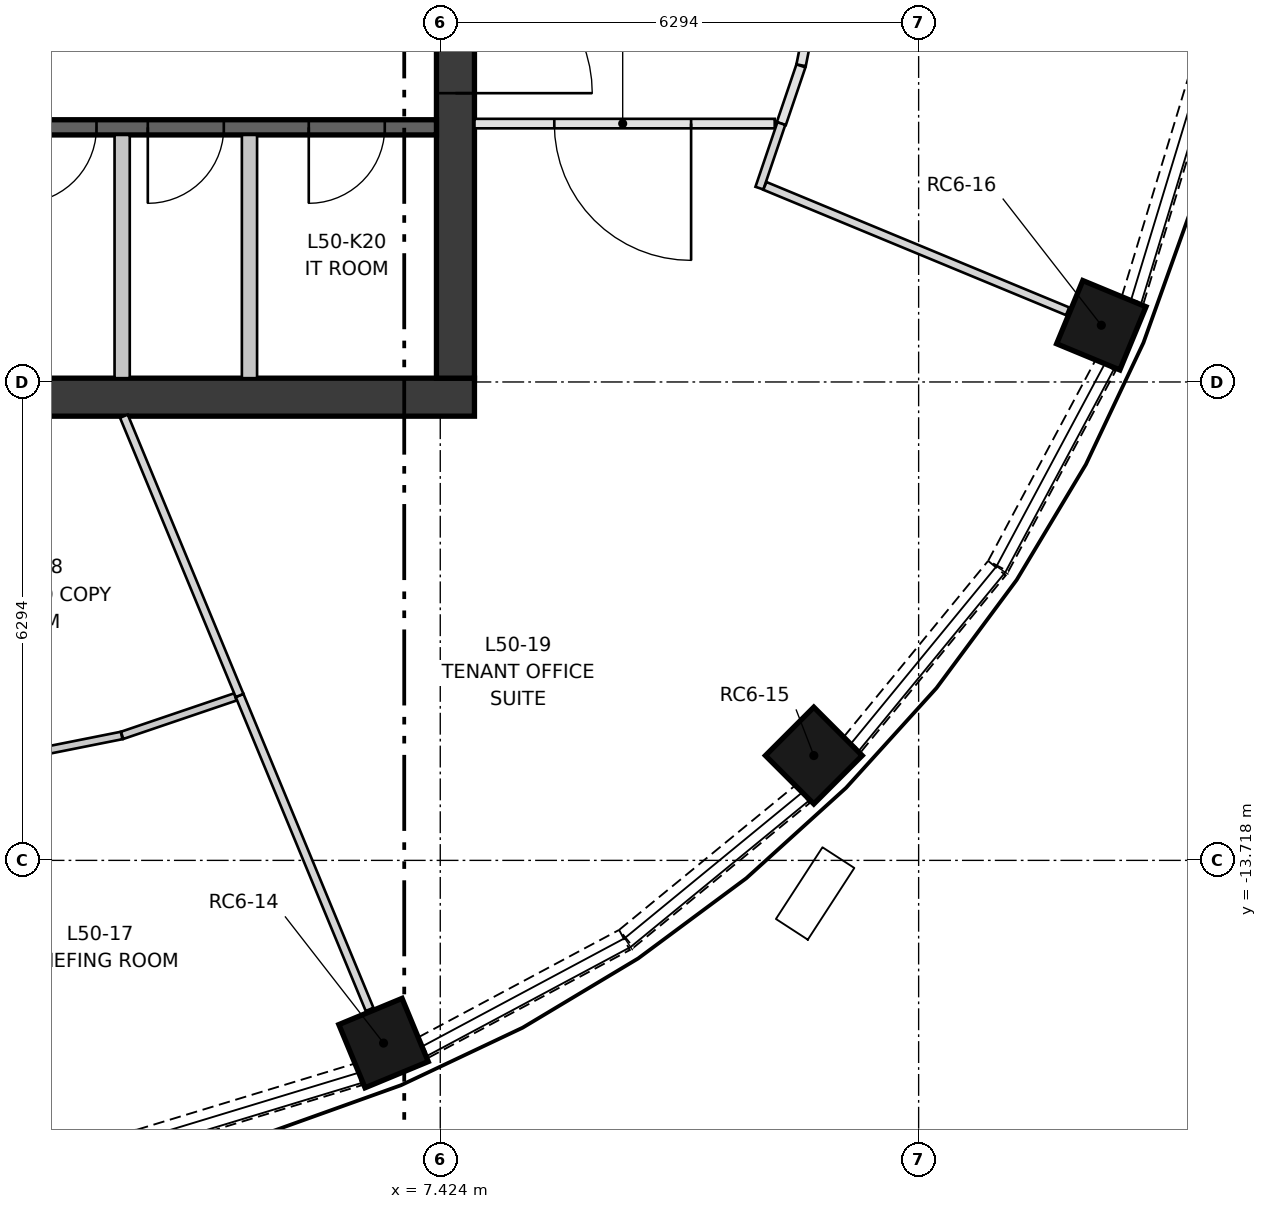
"""IFC4 building model, lengths in metres.
Left out: names, types, materials, properties, quantities, classifications, styles, units other than length and angle.
Written with IfcOpenShell. Run it as: python <this file> out.ifc"""

import sys

from ifc_helpers import new_model, si_unit, direction, frame, frame_2d, origin, origin_2d, place, context, subcontext, project, spatial, rectangle, extrude, element, fill, save


model = new_model("IFC4")
c1 = context("Model", 3, precision=1e-05, world=origin(), true_north=direction((0.0, 1.0)))
c2 = subcontext(c1, "Body", "Model", "MODEL_VIEW")
j1 = project(units=[si_unit("LENGTHUNIT", "METRE"), si_unit("PLANEANGLEUNIT", "RADIAN")], contexts=[c1])
p1 = place(None, origin())
s1 = spatial("IfcSite", under=j1, at=p1, CompositionType="ELEMENT")
p2 = place(p1, origin())
s2 = spatial("IfcBuilding", under=s1, at=p2, CompositionType="ELEMENT")
p3 = place(p2, frame((0.0, 0.0, 187.65)))
s3 = spatial("IfcBuildingStorey", under=s2, at=p3, CompositionType="ELEMENT", Elevation=187.65)
for number, where, z_axis, x_axis in (
    (1, (6.678, -16.122, 0.5), (0.0, 0.0, 1.0), (0.383, -0.924, 0.0)),
    (2, (12.339, -12.339, 0.5), (0.0, 0.0, 1.0), (0.707, -0.707, 0.0)),
    (3, (16.122, -6.678, 0.5), (0.0, 0.0, 1.0), (0.924, -0.383, 0.0)),
):
    element("IfcColumn", number, at=place(p3, frame(where, z_axis=z_axis, x_axis=x_axis)), inside=s3, PredefinedType="COLUMN", context=c2, shape_type="SweptSolid", body=[
        extrude(rectangle(XDim=0.9, YDim=0.9, at=origin_2d()), origin(), (0.0, 0.0, 1.0), 2.85),
    ])
p4 = place(p3, frame((-7.874, -7.624, 0.0), z_axis=(0.0, 0.0, 1.0), x_axis=(1.0, 0.0, 0.0)))
e4 = element("IfcWall", 4, at=p4, inside=s3, PredefinedType="SHEAR", context=c2, shape_type="SweptSolid", body=[
    extrude(rectangle(XDim=15.748, YDim=0.5, at=frame_2d((7.874, 0.0))), origin(), (0.0, 0.0, 1.0), 3.35),
])
p5 = place(p3, frame((7.624, -7.374, 0.0), z_axis=(0.0, 0.0, 1.0), x_axis=(0.0, 1.0, 0.0)))
e5 = element("IfcWall", 5, at=p5, inside=s3, PredefinedType="SHEAR", context=c2, shape_type="SweptSolid", body=[
    extrude(rectangle(XDim=14.748, YDim=0.5, at=frame_2d((7.374, 0.0))), origin(), (0.0, 0.0, 1.0), 3.35),
])
p6 = place(p5, frame((6.874, 0.0, 0.0)))
e6 = element("IfcOpeningElement", 6, at=p6, cuts=e5, PredefinedType="OPENING", context=c2, shape_type="SweptSolid", body=[
    extrude(rectangle(XDim=1.0, YDim=2.1, at=frame_2d((0.5, 1.05))), frame((0.0, 0.26, 0.0), z_axis=(0.0, -1.0, 0.0), x_axis=(1.0, 0.0, 0.0)), (0.0, 0.0, 1.0), 0.52),
])
p7 = place(p5, frame((3.75, 0.0, 0.0)))
e7 = element("IfcOpeningElement", 7, at=p7, cuts=e5, PredefinedType="OPENING", context=c2, shape_type="SweptSolid", body=[
    extrude(rectangle(XDim=1.8, YDim=2.1, at=frame_2d((0.9, 1.05))), frame((0.0, 0.26, 0.0), z_axis=(0.0, -1.0, 0.0), x_axis=(1.0, 0.0, 0.0)), (0.0, 0.0, 1.0), 0.52),
])
p8 = place(p5, frame((9.198, 0.0, 0.0)))
e8 = element("IfcOpeningElement", 8, at=p8, cuts=e5, PredefinedType="OPENING", context=c2, shape_type="SweptSolid", body=[
    extrude(rectangle(XDim=1.8, YDim=2.1, at=frame_2d((0.9, 1.05))), frame((0.0, 0.26, 0.0), z_axis=(0.0, -1.0, 0.0), x_axis=(1.0, 0.0, 0.0)), (0.0, 0.0, 1.0), 0.52),
])
p9 = place(p3, frame((-7.374, -4.074, 0.0), z_axis=(0.0, 0.0, 1.0), x_axis=(1.0, 0.0, 0.0)))
e9 = element("IfcWall", 9, at=p9, inside=s3, PredefinedType="SHEAR", context=c2, shape_type="SweptSolid", body=[
    extrude(rectangle(XDim=14.748, YDim=0.2, at=frame_2d((7.374, 0.0))), origin(), (0.0, 0.0, 1.0), 3.0),
])
p10 = place(p9, frame((1.319, 0.0, 0.0)))
e10 = element("IfcOpeningElement", 10, at=p10, cuts=e9, PredefinedType="OPENING", context=c2, shape_type="SweptSolid", body=[
    extrude(rectangle(XDim=1.1, YDim=2.1, at=frame_2d((0.55, 1.05))), frame((0.0, 0.11, 0.0), z_axis=(0.0, -1.0, 0.0), x_axis=(1.0, 0.0, 0.0)), (0.0, 0.0, 1.0), 0.22),
])
p11 = place(p9, frame((4.456, 0.0, 0.0)))
e11 = element("IfcOpeningElement", 11, at=p11, cuts=e9, PredefinedType="OPENING", context=c2, shape_type="SweptSolid", body=[
    extrude(rectangle(XDim=1.1, YDim=2.1, at=frame_2d((0.55, 1.05))), frame((0.0, 0.11, 0.0), z_axis=(0.0, -1.0, 0.0), x_axis=(1.0, 0.0, 0.0)), (0.0, 0.0, 1.0), 0.22),
])
p12 = place(p9, frame((7.256, 0.0, 0.0)))
e12 = element("IfcOpeningElement", 12, at=p12, cuts=e9, PredefinedType="OPENING", context=c2, shape_type="SweptSolid", body=[
    extrude(rectangle(XDim=1.0, YDim=2.1, at=frame_2d((0.5, 1.05))), frame((0.0, 0.11, 0.0), z_axis=(0.0, -1.0, 0.0), x_axis=(1.0, 0.0, 0.0)), (0.0, 0.0, 1.0), 0.22),
])
p13 = place(p9, frame((9.275, 0.0, 0.0)))
e13 = element("IfcOpeningElement", 13, at=p13, cuts=e9, PredefinedType="OPENING", context=c2, shape_type="SweptSolid", body=[
    extrude(rectangle(XDim=1.0, YDim=2.1, at=frame_2d((0.5, 1.05))), frame((0.0, 0.11, 0.0), z_axis=(0.0, -1.0, 0.0), x_axis=(1.0, 0.0, 0.0)), (0.0, 0.0, 1.0), 0.22),
])
p14 = place(p9, frame((10.95, 0.0, 0.0)))
e14 = element("IfcOpeningElement", 14, at=p14, cuts=e9, PredefinedType="OPENING", context=c2, shape_type="SweptSolid", body=[
    extrude(rectangle(XDim=1.0, YDim=2.1, at=frame_2d((0.5, 1.05))), frame((0.0, 0.11, 0.0), z_axis=(0.0, -1.0, 0.0), x_axis=(1.0, 0.0, 0.0)), (0.0, 0.0, 1.0), 0.22),
])
p15 = place(p9, frame((13.068, 0.0, 0.0)))
e15 = element("IfcOpeningElement", 15, at=p15, cuts=e9, PredefinedType="OPENING", context=c2, shape_type="SweptSolid", body=[
    extrude(rectangle(XDim=1.0, YDim=2.1, at=frame_2d((0.5, 1.05))), frame((0.0, 0.11, 0.0), z_axis=(0.0, -1.0, 0.0), x_axis=(1.0, 0.0, 0.0)), (0.0, 0.0, 1.0), 0.22),
])
for number, where, z_axis, x_axis in (
    (16, (3.239, -7.374, 0.0), (0.0, 0.0, 1.0), (0.0, 1.0, 0.0)),
    (17, (4.914, -7.374, 0.0), (0.0, 0.0, 1.0), (0.0, 1.0, 0.0)),
):
    element("IfcWall", number, at=place(p3, frame(where, z_axis=z_axis, x_axis=x_axis)), inside=s3, PredefinedType="PARTITIONING", context=c2, shape_type="SweptSolid", body=[
        extrude(rectangle(XDim=3.2, YDim=0.2, at=frame_2d((1.6, 0.0))), origin(), (0.0, 0.0, 1.0), 3.0),
    ])
p16 = place(p3, frame((3.477, -17.405, 0.0), z_axis=(0.0, 0.0, 1.0), x_axis=(0.95687774785, 0.290490921835, 0.0)))
e18 = element("IfcWall", 18, at=p16, inside=s3, PredefinedType="SOLIDWALL", context=c2, shape_type="SweptSolid", body=[
    extrude(rectangle(XDim=2.999, YDim=0.3, at=frame_2d((1.5, 0.0))), origin(), (0.0, 0.0, 1.0), 0.9),
])
p17 = place(p3, frame((7.204, -16.179, 0.0), z_axis=(0.0, 0.0, 1.0), x_axis=(0.881827169278, 0.471572734074, 0.0)))
e19 = element("IfcWall", 19, at=p17, inside=s3, PredefinedType="SOLIDWALL", context=c2, shape_type="SweptSolid", body=[
    extrude(rectangle(XDim=2.998, YDim=0.3, at=frame_2d((1.499, 0.0))), origin(), (0.0, 0.0, 1.0), 0.9),
])
for number, where, z_axis, x_axis in (
    (20, (9.873, -14.749, 0.0), (0.0, 0.0, 1.0), (0.773, 0.634, 0.0)),
    (21, (12.846, -12.191, 0.0), (0.0, 0.0, 1.0), (0.634, 0.773, 0.0)),
):
    element("IfcWall", number, at=place(p3, frame(where, z_axis=z_axis, x_axis=x_axis)), inside=s3, PredefinedType="SOLIDWALL", context=c2, shape_type="SweptSolid", body=[
        extrude(rectangle(XDim=2.999, YDim=0.3, at=frame_2d((1.5, 0.0))), origin(), (0.0, 0.0, 1.0), 0.9),
    ])
p18 = place(p3, frame((14.765, -9.848, 0.0), z_axis=(0.0, 0.0, 1.0), x_axis=(0.471572734074, 0.881827169278, 0.0)))
e22 = element("IfcWall", 22, at=p18, inside=s3, PredefinedType="SOLIDWALL", context=c2, shape_type="SweptSolid", body=[
    extrude(rectangle(XDim=2.998, YDim=0.3, at=frame_2d((1.499, 0.0))), origin(), (0.0, 0.0, 1.0), 0.9),
])
p19 = place(p3, frame((16.533, -6.347, 0.0), z_axis=(0.0, 0.0, 1.0), x_axis=(0.290490921835, 0.95687774785, 0.0)))
e23 = element("IfcWall", 23, at=p19, inside=s3, PredefinedType="SOLIDWALL", context=c2, shape_type="SweptSolid", body=[
    extrude(rectangle(XDim=2.999, YDim=0.3, at=frame_2d((1.5, 0.0))), origin(), (0.0, 0.0, 1.0), 0.9),
])
p20 = place(p3, frame((12.169, -3.265, 0.0), z_axis=(0.0, 0.0, 1.0), x_axis=(-0.321427947704, -0.946934039115, 0.0)))
e24 = element("IfcWall", 24, at=p20, inside=s3, PredefinedType="PARTITIONING", context=c2, shape_type="SweptSolid", body=[
    extrude(rectangle(XDim=0.802, YDim=0.125, at=frame_2d((0.401, 0.0))), origin(), (0.0, 0.0, 1.0), 3.0),
])
p21 = place(p3, frame((12.491, -1.649, 0.0), z_axis=(0.0, 0.0, 1.0), x_axis=(-0.195171279076, -0.980769173569, 0.0)))
e25 = element("IfcWall", 25, at=p21, inside=s3, PredefinedType="PARTITIONING", context=c2, shape_type="SweptSolid", body=[
    extrude(rectangle(XDim=1.64, YDim=0.125, at=frame_2d((0.82, 0.0))), origin(), (0.0, 0.0, 1.0), 3.0),
])
p22 = place(p3, frame((11.824, -4.024, 0.0), z_axis=(0.0, 0.0, 1.0), x_axis=(-1.0, 0.0, 0.0)))
e26 = element("IfcWall", 26, at=p22, inside=s3, PredefinedType="PARTITIONING", context=c2, shape_type="SweptSolid", body=[
    extrude(rectangle(XDim=3.95, YDim=0.125, at=frame_2d((1.975, 0.0))), origin(), (0.0, 0.0, 1.0), 3.0),
])
p23 = place(p22, frame((1.1, 0.0, 0.0)))
e27 = element("IfcOpeningElement", 27, at=p23, cuts=e26, PredefinedType="OPENING", context=c2, shape_type="SweptSolid", body=[
    extrude(rectangle(XDim=1.8, YDim=2.1, at=frame_2d((0.9, 1.05))), frame((0.0, 0.073, 0.0), z_axis=(0.0, -1.0, 0.0), x_axis=(1.0, 0.0, 0.0)), (0.0, 0.0, 1.0), 0.145),
])
p24 = place(p3, frame((11.623, -4.874, 0.0), z_axis=(0.0, 0.0, 1.0), x_axis=(0.321448894187, 0.946926928768, 0.0)))
e28 = element("IfcWall", 28, at=p24, inside=s3, PredefinedType="PARTITIONING", context=c2, shape_type="SweptSolid", body=[
    extrude(rectangle(XDim=0.897, YDim=0.11, at=frame_2d((0.448, 0.0))), origin(), (0.0, 0.0, 1.0), 3.0),
])
p25 = place(p3, frame((15.678, -6.494, 0.0), z_axis=(0.0, 0.0, 1.0), x_axis=(-0.923869121921, 0.382708564787, 0.0)))
e29 = element("IfcWall", 29, at=p25, inside=s3, PredefinedType="PARTITIONING", context=c2, shape_type="SweptSolid", body=[
    extrude(rectangle(XDim=4.311, YDim=0.11, at=frame_2d((2.156, 0.0))), origin(), (0.0, 0.0, 1.0), 3.0),
])
p26 = place(p3, frame((1.635, -12.393, 0.0), z_axis=(0.0, 0.0, 1.0), x_axis=(0.980764756379, 0.195193474902, 0.0)))
e30 = element("IfcWall", 30, at=p26, inside=s3, PredefinedType="PARTITIONING", context=c2, shape_type="SweptSolid", body=[
    extrude(rectangle(XDim=1.628, YDim=0.1, at=frame_2d((0.814, 0.0))), origin(), (0.0, 0.0, 1.0), 3.0),
])
p27 = place(p3, frame((3.238, -12.073, 0.0), z_axis=(0.0, 0.0, 1.0), x_axis=(0.946962681405, 0.321343554512, 0.0)))
e31 = element("IfcWall", 31, at=p27, inside=s3, PredefinedType="PARTITIONING", context=c2, shape_type="SweptSolid", body=[
    extrude(rectangle(XDim=1.573, YDim=0.1, at=frame_2d((0.787, 0.0))), origin(), (0.0, 0.0, 1.0), 3.0),
])
p28 = place(p3, frame((4.783, -11.549, 0.0), z_axis=(0.0, 0.0, 1.0), x_axis=(0.382710359347, -0.92386837853, 0.0)))
e32 = element("IfcWall", 32, at=p28, inside=s3, PredefinedType="PARTITIONING", context=c2, shape_type="SweptSolid", body=[
    extrude(rectangle(XDim=4.47, YDim=0.11, at=frame_2d((2.235, 0.0))), origin(), (0.0, 0.0, 1.0), 3.0),
])
p29 = place(p3, frame((3.261, -7.874, 0.0), z_axis=(0.0, 0.0, 1.0), x_axis=(0.382666229821, -0.923886657851, 0.0)))
e33 = element("IfcWall", 33, at=p29, inside=s3, PredefinedType="PARTITIONING", context=c2, shape_type="SweptSolid", body=[
    extrude(rectangle(XDim=3.977, YDim=0.11, at=frame_2d((1.989, 0.0))), origin(), (0.0, 0.0, 1.0), 3.0),
])
p30 = place(p13, frame((1.0, 0.0, 0.0), z_axis=(0.0, 0.0, 1.0), x_axis=(-1.0, 0.0, 0.0)))
e34 = element("IfcDoor", 34, at=p30, inside=s3, OperationType="SINGLE_SWING_LEFT", PredefinedType="DOOR", context=c2, shape_type="SweptSolid", body=[
    extrude(rectangle(XDim=1.0, YDim=2.1, at=frame_2d((0.5, 1.05))), frame((0.0, 0.025, 0.0), z_axis=(0.0, -1.0, 0.0), x_axis=(1.0, 0.0, 0.0)), (0.0, 0.0, 1.0), 0.05),
])
fill(e13, e34)
p31 = place(p14, frame((1.0, 0.0, 0.0), z_axis=(0.0, 0.0, 1.0), x_axis=(-1.0, 0.0, 0.0)))
e35 = element("IfcDoor", 35, at=p31, inside=s3, OperationType="SINGLE_SWING_LEFT", PredefinedType="DOOR", context=c2, shape_type="SweptSolid", body=[
    extrude(rectangle(XDim=1.0, YDim=2.1, at=frame_2d((0.5, 1.05))), frame((0.0, 0.025, 0.0), z_axis=(0.0, -1.0, 0.0), x_axis=(1.0, 0.0, 0.0)), (0.0, 0.0, 1.0), 0.05),
])
fill(e14, e35)
p32 = place(p15, frame((1.0, 0.0, 0.0), z_axis=(0.0, 0.0, 1.0), x_axis=(-1.0, 0.0, 0.0)))
e36 = element("IfcDoor", 36, at=p32, inside=s3, OperationType="SINGLE_SWING_LEFT", PredefinedType="DOOR", context=c2, shape_type="SweptSolid", body=[
    extrude(rectangle(XDim=1.0, YDim=2.1, at=frame_2d((0.5, 1.05))), frame((0.0, 0.025, 0.0), z_axis=(0.0, -1.0, 0.0), x_axis=(1.0, 0.0, 0.0)), (0.0, 0.0, 1.0), 0.05),
])
fill(e15, e36)
p33 = place(p7, frame((1.8, 0.0, 0.0), z_axis=(0.0, 0.0, 1.0), x_axis=(-1.0, 0.0, 0.0)))
e37 = element("IfcDoor", 37, at=p33, inside=s3, OperationType="DOUBLE_DOOR_SINGLE_SWING", PredefinedType="DOOR", context=c2, shape_type="SweptSolid", body=[
    extrude(rectangle(XDim=1.8, YDim=2.1, at=frame_2d((0.9, 1.05))), frame((0.0, 0.025, 0.0), z_axis=(0.0, -1.0, 0.0), x_axis=(1.0, 0.0, 0.0)), (0.0, 0.0, 1.0), 0.05),
])
fill(e7, e37)
p34 = place(p23, origin())
e38 = element("IfcDoor", 38, at=p34, inside=s3, OperationType="DOUBLE_DOOR_SINGLE_SWING", PredefinedType="DOOR", context=c2, shape_type="SweptSolid", body=[
    extrude(rectangle(XDim=1.8, YDim=2.1, at=frame_2d((0.9, 1.05))), frame((0.0, 0.025, 0.0), z_axis=(0.0, -1.0, 0.0), x_axis=(1.0, 0.0, 0.0)), (0.0, 0.0, 1.0), 0.05),
])
fill(e27, e38)
save(model, sys.argv[1])
